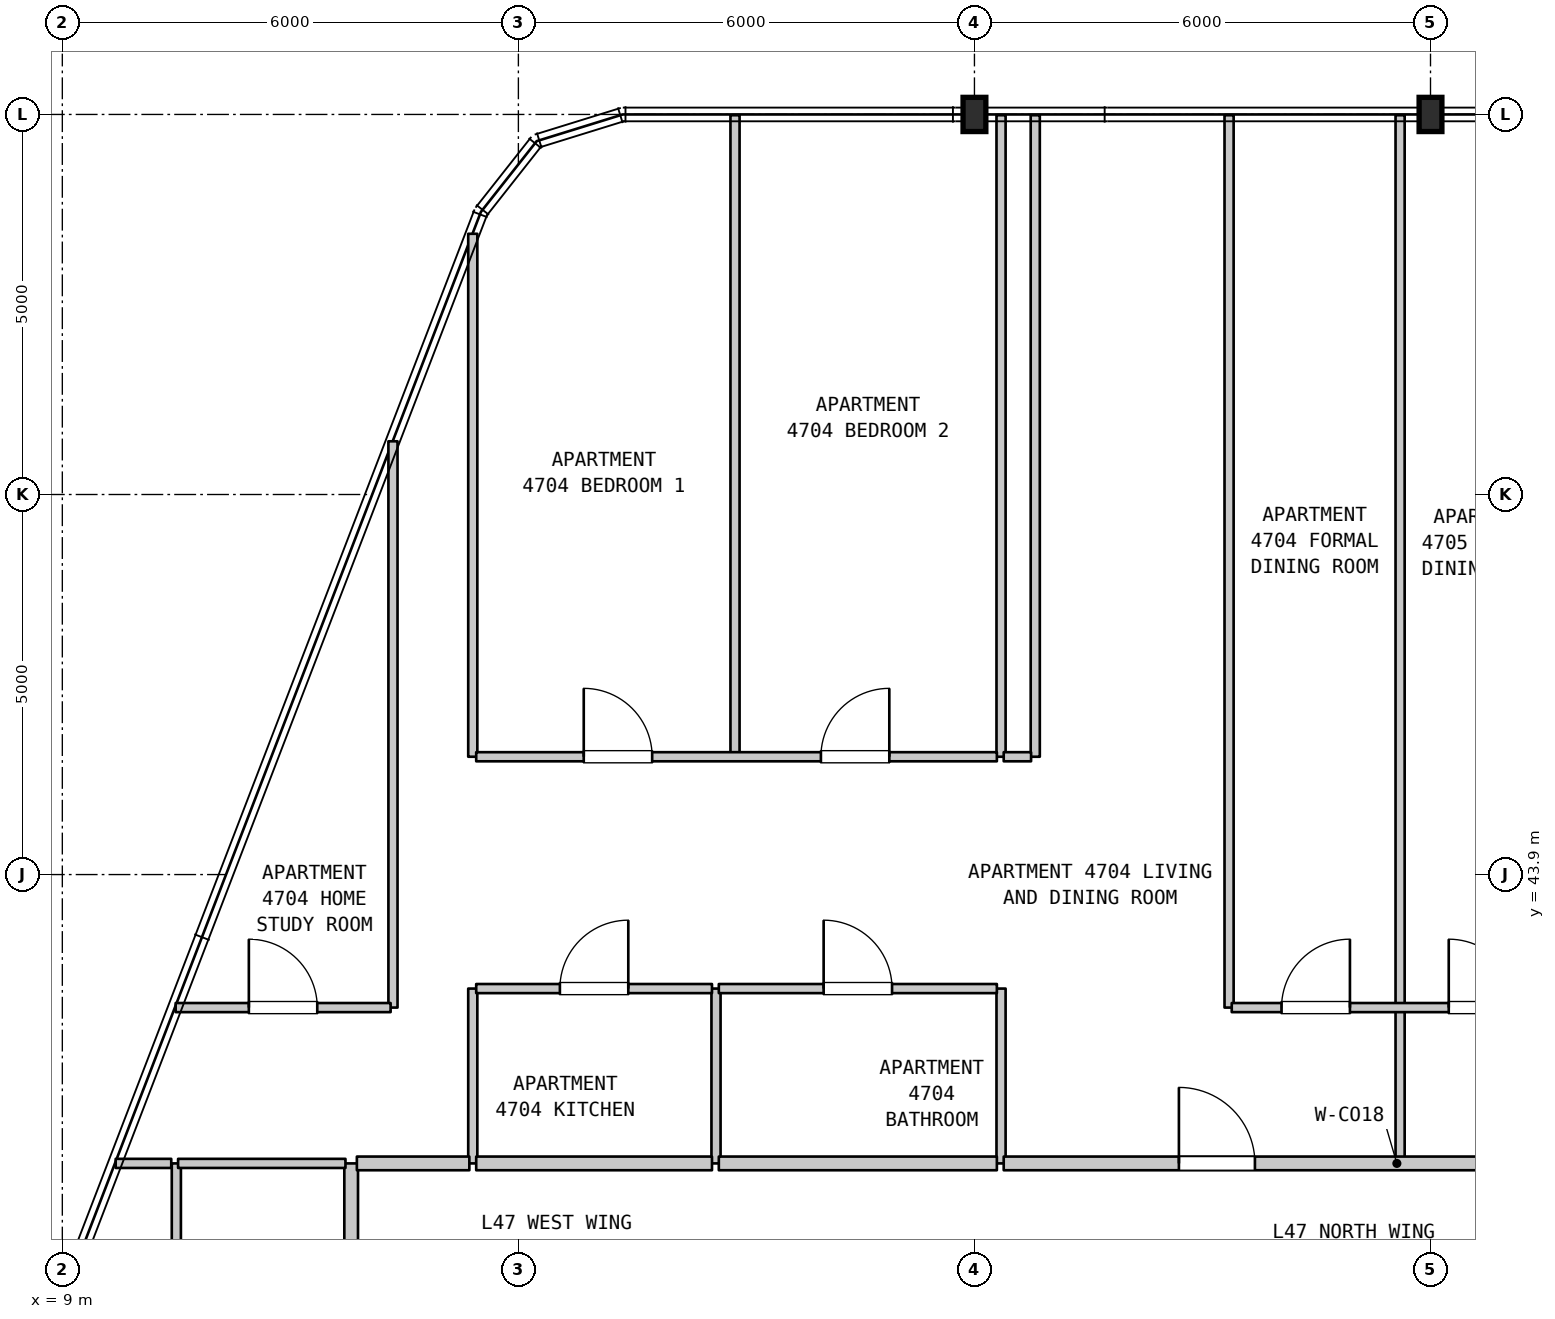
"""IFC4 building model, lengths in metres.
Left out: names, types, materials, properties, quantities, classifications, styles, units other than length and angle.
Written with IfcOpenShell. Run it as: python <this file> out.ifc"""

import sys

from ifc_helpers import new_model, si_unit, direction, frame, frame_2d, origin, origin_2d, place, context, subcontext, project, spatial, rectangle, i_section, extrude, element, fill, save


model = new_model("IFC4")
c1 = context("Model", 3, precision=1e-05, world=origin(), true_north=direction((0.0, 1.0)))
c2 = subcontext(c1, "Body", "Model", "MODEL_VIEW")
j1 = project(units=[si_unit("LENGTHUNIT", "METRE"), si_unit("PLANEANGLEUNIT", "RADIAN")], contexts=[c1])
p1 = place(None, origin())
s1 = spatial("IfcSite", under=j1, at=p1, CompositionType="ELEMENT")
p2 = place(p1, origin())
s2 = spatial("IfcBuilding", under=s1, at=p2, CompositionType="ELEMENT")
p3 = place(p2, frame((0.0, 0.0, 192.1)))
s3 = spatial("IfcBuildingStorey", under=s2, at=p3, CompositionType="ELEMENT", Elevation=192.1)
for number, where, z_axis, x_axis in (
    (1, (21.0, 53.9, 0.0), (0.0, 0.0, 1.0), (1.0, 0.0, 0.0)),
    (2, (27.0, 53.9, 0.0), (0.0, 0.0, 1.0), (1.0, 0.0, 0.0)),
):
    element("IfcColumn", number, at=place(p3, frame(where, z_axis=z_axis, x_axis=x_axis)), inside=s3, PredefinedType="COLUMN", context=c2, shape_type="SweptSolid", body=[
        extrude(i_section(OverallWidth=0.3, OverallDepth=0.45, WebThickness=0.014, FlangeThickness=0.026, FilletRadius=0.027, at=origin_2d()), origin(), (0.0, 0.0, 1.0), 3.7),
    ])
p4 = place(p3, frame((10.5, 31.45, 0.0), z_axis=(0.0, 0.0, 1.0), x_axis=(0.0, 1.0, 0.0)))
e3 = element("IfcWall", 3, at=p4, inside=s3, PredefinedType="PARTITIONING", context=c2, shape_type="SweptSolid", body=[
    extrude(rectangle(XDim=8.65, YDim=0.12, at=frame_2d((4.325, 0.0))), origin(), (0.0, 0.0, 1.0), 3.39),
])
p5 = place(p3, frame((12.8, 31.45, 0.0), z_axis=(0.0, 0.0, 1.0), x_axis=(0.0, 1.0, 0.0)))
e4 = element("IfcWall", 4, at=p5, inside=s3, PredefinedType="STANDARD", context=c2, shape_type="SweptSolid", body=[
    extrude(rectangle(XDim=8.65, YDim=0.18, at=frame_2d((4.325, 0.0))), origin(), (0.0, 0.0, 1.0), 3.39),
])
p6 = place(p3, frame((13.35, 42.15, 0.0), z_axis=(0.0, 0.0, 1.0), x_axis=(0.0, 1.0, 0.0)))
e5 = element("IfcWall", 5, at=p6, inside=s3, PredefinedType="PARTITIONING", context=c2, shape_type="SweptSolid", body=[
    extrude(rectangle(XDim=7.45, YDim=0.12, at=frame_2d((3.725, 0.0))), origin(), (0.0, 0.0, 1.0), 3.39),
])
p7 = place(p3, frame((14.4, 40.1, 0.0), z_axis=(0.0, 0.0, 1.0), x_axis=(0.0, 1.0, 0.0)))
e6 = element("IfcWall", 6, at=p7, inside=s3, PredefinedType="PARTITIONING", context=c2, shape_type="SweptSolid", body=[
    extrude(rectangle(XDim=2.3, YDim=0.12, at=frame_2d((1.15, 0.0))), origin(), (0.0, 0.0, 1.0), 3.39),
])
p8 = place(p3, frame((14.4, 45.45, 0.0), z_axis=(0.0, 0.0, 1.0), x_axis=(0.0, 1.0, 0.0)))
e7 = element("IfcWall", 7, at=p8, inside=s3, PredefinedType="PARTITIONING", context=c2, shape_type="SweptSolid", body=[
    extrude(rectangle(XDim=6.88, YDim=0.12, at=frame_2d((3.44, 0.0))), origin(), (0.0, 0.0, 1.0), 3.39),
])
p9 = place(p3, frame((17.6, 40.1, 0.0), z_axis=(0.0, 0.0, 1.0), x_axis=(0.0, 1.0, 0.0)))
e8 = element("IfcWall", 8, at=p9, inside=s3, PredefinedType="PARTITIONING", context=c2, shape_type="SweptSolid", body=[
    extrude(rectangle(XDim=2.3, YDim=0.12, at=frame_2d((1.15, 0.0))), origin(), (0.0, 0.0, 1.0), 3.39),
])
p10 = place(p3, frame((17.85, 45.45, 0.0), z_axis=(0.0, 0.0, 1.0), x_axis=(0.0, 1.0, 0.0)))
e9 = element("IfcWall", 9, at=p10, inside=s3, PredefinedType="PARTITIONING", context=c2, shape_type="SweptSolid", body=[
    extrude(rectangle(XDim=8.44, YDim=0.12, at=frame_2d((4.22, 0.0))), origin(), (0.0, 0.0, 1.0), 3.39),
])
p11 = place(p3, frame((21.35, 40.1, 0.0), z_axis=(0.0, 0.0, 1.0), x_axis=(0.0, 1.0, 0.0)))
e10 = element("IfcWall", 10, at=p11, inside=s3, PredefinedType="PARTITIONING", context=c2, shape_type="SweptSolid", body=[
    extrude(rectangle(XDim=2.3, YDim=0.12, at=frame_2d((1.15, 0.0))), origin(), (0.0, 0.0, 1.0), 3.39),
])
for number, where, z_axis, x_axis in (
    (11, (21.35, 45.45, 0.0), (0.0, 0.0, 1.0), (0.0, 1.0, 0.0)),
    (12, (21.8, 45.45, 0.0), (0.0, 0.0, 1.0), (0.0, 1.0, 0.0)),
):
    element("IfcWall", number, at=place(p3, frame(where, z_axis=z_axis, x_axis=x_axis)), inside=s3, PredefinedType="PARTITIONING", context=c2, shape_type="SweptSolid", body=[
        extrude(rectangle(XDim=8.44, YDim=0.12, at=frame_2d((4.22, 0.0))), origin(), (0.0, 0.0, 1.0), 3.39),
    ])
p12 = place(p3, frame((24.35, 42.15, 0.0), z_axis=(0.0, 0.0, 1.0), x_axis=(0.0, 1.0, 0.0)))
e13 = element("IfcWall", 13, at=p12, inside=s3, PredefinedType="PARTITIONING", context=c2, shape_type="SweptSolid", body=[
    extrude(rectangle(XDim=11.74, YDim=0.12, at=frame_2d((5.87, 0.0))), origin(), (0.0, 0.0, 1.0), 3.39),
])
p13 = place(p3, frame((26.6, 40.1, 0.0), z_axis=(0.0, 0.0, 1.0), x_axis=(0.0, 1.0, 0.0)))
e14 = element("IfcWall", 14, at=p13, inside=s3, PredefinedType="PARTITIONING", context=c2, shape_type="SweptSolid", body=[
    extrude(rectangle(XDim=2.05, YDim=0.12, at=frame_2d((1.025, 0.0))), origin(), (0.0, 0.0, 1.0), 3.39),
])
p14 = place(p3, frame((26.6, 42.15, 0.0), z_axis=(0.0, 0.0, 1.0), x_axis=(0.0, 1.0, 0.0)))
e15 = element("IfcWall", 15, at=p14, inside=s3, PredefinedType="PARTITIONING", context=c2, shape_type="SweptSolid", body=[
    extrude(rectangle(XDim=11.74, YDim=0.12, at=frame_2d((5.87, 0.0))), origin(), (0.0, 0.0, 1.0), 3.39),
])
p15 = place(p3, frame((9.702, 40.1, 0.0), z_axis=(0.0, 0.0, 1.0), x_axis=(1.0, 0.0, 0.0)))
e16 = element("IfcWall", 16, at=p15, inside=s3, PredefinedType="PARTITIONING", context=c2, shape_type="SweptSolid", body=[
    extrude(rectangle(XDim=0.731, YDim=0.12, at=frame_2d((0.366, 0.0))), origin(), (0.0, 0.0, 1.0), 3.39),
])
p16 = place(p3, frame((10.523, 40.1, 0.0), z_axis=(0.0, 0.0, 1.0), x_axis=(1.0, 0.0, 0.0)))
e17 = element("IfcWall", 17, at=p16, inside=s3, PredefinedType="PARTITIONING", context=c2, shape_type="SweptSolid", body=[
    extrude(rectangle(XDim=2.202, YDim=0.12, at=frame_2d((1.101, 0.0))), origin(), (0.0, 0.0, 1.0), 3.39),
])
p17 = place(p3, frame((12.875, 40.1, 0.0), z_axis=(0.0, 0.0, 1.0), x_axis=(1.0, 0.0, 0.0)))
e18 = element("IfcWall", 18, at=p17, inside=s3, PredefinedType="STANDARD", context=c2, shape_type="SweptSolid", body=[
    extrude(rectangle(XDim=1.48, YDim=0.18, at=frame_2d((0.74, 0.0))), origin(), (0.0, 0.0, 1.0), 3.39),
])
p18 = place(p3, frame((14.445, 40.1, 0.0), z_axis=(0.0, 0.0, 1.0), x_axis=(1.0, 0.0, 0.0)))
e19 = element("IfcWall", 19, at=p18, inside=s3, PredefinedType="STANDARD", context=c2, shape_type="SweptSolid", body=[
    extrude(rectangle(XDim=3.102, YDim=0.18, at=frame_2d((1.551, 0.0))), origin(), (0.0, 0.0, 1.0), 3.39),
])
p19 = place(p3, frame((17.637, 40.1, 0.0), z_axis=(0.0, 0.0, 1.0), x_axis=(1.0, 0.0, 0.0)))
e20 = element("IfcWall", 20, at=p19, inside=s3, PredefinedType="STANDARD", context=c2, shape_type="SweptSolid", body=[
    extrude(rectangle(XDim=3.658, YDim=0.18, at=frame_2d((1.829, 0.0))), origin(), (0.0, 0.0, 1.0), 3.39),
])
p20 = place(p3, frame((21.385, 40.1, 0.0), z_axis=(0.0, 0.0, 1.0), x_axis=(1.0, 0.0, 0.0)))
e21 = element("IfcWall", 21, at=p20, inside=s3, PredefinedType="STANDARD", context=c2, shape_type="SweptSolid", body=[
    extrude(rectangle(XDim=10.345, YDim=0.18, at=frame_2d((5.172, 0.0))), origin(), (0.0, 0.0, 1.0), 3.39),
])
p21 = place(p20, frame((2.305, 0.0, 0.0)))
e22 = element("IfcOpeningElement", 22, at=p21, cuts=e21, PredefinedType="OPENING", context=c2, shape_type="SweptSolid", body=[
    extrude(rectangle(XDim=1.0, YDim=2.15, at=frame_2d((0.5, 1.075))), frame((0.0, 0.1, 0.0), z_axis=(0.0, -1.0, 0.0), x_axis=(1.0, 0.0, 0.0)), (0.0, 0.0, 1.0), 0.2),
])
p22 = place(p20, frame((7.235, 0.0, 0.0)))
e23 = element("IfcOpeningElement", 23, at=p22, cuts=e21, PredefinedType="OPENING", context=c2, shape_type="SweptSolid", body=[
    extrude(rectangle(XDim=1.0, YDim=2.15, at=frame_2d((0.5, 1.075))), frame((0.0, 0.1, 0.0), z_axis=(0.0, -1.0, 0.0), x_axis=(1.0, 0.0, 0.0)), (0.0, 0.0, 1.0), 0.2),
])
p23 = place(p3, frame((10.491, 42.15, 0.0), z_axis=(0.0, 0.0, 1.0), x_axis=(1.0, 0.0, 0.0)))
e24 = element("IfcWall", 24, at=p23, inside=s3, PredefinedType="PARTITIONING", context=c2, shape_type="SweptSolid", body=[
    extrude(rectangle(XDim=2.828, YDim=0.12, at=frame_2d((1.414, 0.0))), origin(), (0.0, 0.0, 1.0), 3.39),
])
p24 = place(p23, frame((0.963, 0.0, 0.0)))
e25 = element("IfcOpeningElement", 25, at=p24, cuts=e24, PredefinedType="OPENING", context=c2, shape_type="SweptSolid", body=[
    extrude(rectangle(XDim=0.9, YDim=2.15, at=frame_2d((0.45, 1.075))), frame((0.0, 0.07, 0.0), z_axis=(0.0, -1.0, 0.0), x_axis=(1.0, 0.0, 0.0)), (0.0, 0.0, 1.0), 0.14),
])
p25 = place(p3, frame((24.385, 42.15, 0.0), z_axis=(0.0, 0.0, 1.0), x_axis=(1.0, 0.0, 0.0)))
e26 = element("IfcWall", 26, at=p25, inside=s3, PredefinedType="PARTITIONING", context=c2, shape_type="SweptSolid", body=[
    extrude(rectangle(XDim=4.41, YDim=0.12, at=frame_2d((2.205, 0.0))), origin(), (0.0, 0.0, 1.0), 3.39),
])
p26 = place(p25, frame((0.655, 0.0, 0.0)))
e27 = element("IfcOpeningElement", 27, at=p26, cuts=e26, PredefinedType="OPENING", context=c2, shape_type="SweptSolid", body=[
    extrude(rectangle(XDim=0.9, YDim=2.15, at=frame_2d((0.45, 1.075))), frame((0.0, 0.07, 0.0), z_axis=(0.0, -1.0, 0.0), x_axis=(1.0, 0.0, 0.0)), (0.0, 0.0, 1.0), 0.14),
])
p27 = place(p25, frame((2.855, 0.0, 0.0)))
e28 = element("IfcOpeningElement", 28, at=p27, cuts=e26, PredefinedType="OPENING", context=c2, shape_type="SweptSolid", body=[
    extrude(rectangle(XDim=0.9, YDim=2.15, at=frame_2d((0.45, 1.075))), frame((0.0, 0.07, 0.0), z_axis=(0.0, -1.0, 0.0), x_axis=(1.0, 0.0, 0.0)), (0.0, 0.0, 1.0), 0.14),
])
p28 = place(p3, frame((14.445, 42.4, 0.0), z_axis=(0.0, 0.0, 1.0), x_axis=(1.0, 0.0, 0.0)))
e29 = element("IfcWall", 29, at=p28, inside=s3, PredefinedType="PARTITIONING", context=c2, shape_type="SweptSolid", body=[
    extrude(rectangle(XDim=3.102, YDim=0.12, at=frame_2d((1.551, 0.0))), origin(), (0.0, 0.0, 1.0), 3.39),
])
p29 = place(p28, frame((1.101, 0.0, 0.0)))
e30 = element("IfcOpeningElement", 30, at=p29, cuts=e29, PredefinedType="OPENING", context=c2, shape_type="SweptSolid", body=[
    extrude(rectangle(XDim=0.9, YDim=2.15, at=frame_2d((0.45, 1.075))), frame((0.0, 0.07, 0.0), z_axis=(0.0, -1.0, 0.0), x_axis=(1.0, 0.0, 0.0)), (0.0, 0.0, 1.0), 0.14),
])
p30 = place(p3, frame((17.637, 42.4, 0.0), z_axis=(0.0, 0.0, 1.0), x_axis=(1.0, 0.0, 0.0)))
e31 = element("IfcWall", 31, at=p30, inside=s3, PredefinedType="PARTITIONING", context=c2, shape_type="SweptSolid", body=[
    extrude(rectangle(XDim=3.658, YDim=0.12, at=frame_2d((1.829, 0.0))), origin(), (0.0, 0.0, 1.0), 3.39),
])
p31 = place(p30, frame((1.379, 0.0, 0.0)))
e32 = element("IfcOpeningElement", 32, at=p31, cuts=e31, PredefinedType="OPENING", context=c2, shape_type="SweptSolid", body=[
    extrude(rectangle(XDim=0.9, YDim=2.1, at=frame_2d((0.45, 1.05))), frame((0.0, 0.07, 0.0), z_axis=(0.0, -1.0, 0.0), x_axis=(1.0, 0.0, 0.0)), (0.0, 0.0, 1.0), 0.14),
])
p32 = place(p3, frame((14.445, 45.45, 0.0), z_axis=(0.0, 0.0, 1.0), x_axis=(1.0, 0.0, 0.0)))
e33 = element("IfcWall", 33, at=p32, inside=s3, PredefinedType="PARTITIONING", context=c2, shape_type="SweptSolid", body=[
    extrude(rectangle(XDim=6.85, YDim=0.12, at=frame_2d((3.425, 0.0))), origin(), (0.0, 0.0, 1.0), 3.39),
])
p33 = place(p32, frame((1.415, 0.0, 0.0)))
e34 = element("IfcOpeningElement", 34, at=p33, cuts=e33, PredefinedType="OPENING", context=c2, shape_type="SweptSolid", body=[
    extrude(rectangle(XDim=0.9, YDim=2.15, at=frame_2d((0.45, 1.075))), frame((0.0, 0.07, 0.0), z_axis=(0.0, -1.0, 0.0), x_axis=(1.0, 0.0, 0.0)), (0.0, 0.0, 1.0), 0.14),
])
p34 = place(p32, frame((4.535, 0.0, 0.0)))
e35 = element("IfcOpeningElement", 35, at=p34, cuts=e33, PredefinedType="OPENING", context=c2, shape_type="SweptSolid", body=[
    extrude(rectangle(XDim=0.9, YDim=2.15, at=frame_2d((0.45, 1.075))), frame((0.0, 0.07, 0.0), z_axis=(0.0, -1.0, 0.0), x_axis=(1.0, 0.0, 0.0)), (0.0, 0.0, 1.0), 0.14),
])
p35 = place(p3, frame((21.385, 45.45, 0.0), z_axis=(0.0, 0.0, 1.0), x_axis=(1.0, 0.0, 0.0)))
e36 = element("IfcWall", 36, at=p35, inside=s3, PredefinedType="PARTITIONING", context=c2, shape_type="SweptSolid", body=[
    extrude(rectangle(XDim=0.36, YDim=0.12, at=frame_2d((0.18, 0.0))), origin(), (0.0, 0.0, 1.0), 3.39),
])
p36 = place(p21, origin())
e37 = element("IfcDoor", 37, at=p36, inside=s3, OperationType="SINGLE_SWING_LEFT", PredefinedType="DOOR", context=c2, shape_type="SweptSolid", body=[
    extrude(rectangle(XDim=1.0, YDim=2.15, at=frame_2d((0.5, 1.075))), frame((0.0, 0.025, 0.0), z_axis=(0.0, -1.0, 0.0), x_axis=(1.0, 0.0, 0.0)), (0.0, 0.0, 1.0), 0.05),
])
fill(e22, e37)
p37 = place(p24, origin())
e38 = element("IfcDoor", 38, at=p37, inside=s3, OperationType="SINGLE_SWING_LEFT", PredefinedType="DOOR", context=c2, shape_type="SweptSolid", body=[
    extrude(rectangle(XDim=0.9, YDim=2.15, at=frame_2d((0.45, 1.075))), frame((0.0, 0.025, 0.0), z_axis=(0.0, -1.0, 0.0), x_axis=(1.0, 0.0, 0.0)), (0.0, 0.0, 1.0), 0.05),
])
fill(e25, e38)
p38 = place(p26, origin())
e39 = element("IfcDoor", 39, at=p38, inside=s3, OperationType="SINGLE_SWING_RIGHT", PredefinedType="DOOR", context=c2, shape_type="SweptSolid", body=[
    extrude(rectangle(XDim=0.9, YDim=2.15, at=frame_2d((0.45, 1.075))), frame((0.0, 0.025, 0.0), z_axis=(0.0, -1.0, 0.0), x_axis=(1.0, 0.0, 0.0)), (0.0, 0.0, 1.0), 0.05),
])
fill(e27, e39)
p39 = place(p27, origin())
e40 = element("IfcDoor", 40, at=p39, inside=s3, OperationType="SINGLE_SWING_LEFT", PredefinedType="DOOR", context=c2, shape_type="SweptSolid", body=[
    extrude(rectangle(XDim=0.9, YDim=2.15, at=frame_2d((0.45, 1.075))), frame((0.0, 0.025, 0.0), z_axis=(0.0, -1.0, 0.0), x_axis=(1.0, 0.0, 0.0)), (0.0, 0.0, 1.0), 0.05),
])
fill(e28, e40)
p40 = place(p29, origin())
e41 = element("IfcDoor", 41, at=p40, inside=s3, OperationType="SINGLE_SWING_RIGHT", PredefinedType="DOOR", context=c2, shape_type="SweptSolid", body=[
    extrude(rectangle(XDim=0.9, YDim=2.15, at=frame_2d((0.45, 1.075))), frame((0.0, 0.025, 0.0), z_axis=(0.0, -1.0, 0.0), x_axis=(1.0, 0.0, 0.0)), (0.0, 0.0, 1.0), 0.05),
])
fill(e30, e41)
p41 = place(p31, origin())
e42 = element("IfcDoor", 42, at=p41, inside=s3, OperationType="SINGLE_SWING_LEFT", PredefinedType="DOOR", context=c2, shape_type="SweptSolid", body=[
    extrude(rectangle(XDim=0.9, YDim=2.1, at=frame_2d((0.45, 1.05))), frame((0.0, 0.025, 0.0), z_axis=(0.0, -1.0, 0.0), x_axis=(1.0, 0.0, 0.0)), (0.0, 0.0, 1.0), 0.05),
])
fill(e32, e42)
p42 = place(p33, origin())
e43 = element("IfcDoor", 43, at=p42, inside=s3, OperationType="SINGLE_SWING_LEFT", PredefinedType="DOOR", context=c2, shape_type="SweptSolid", body=[
    extrude(rectangle(XDim=0.9, YDim=2.15, at=frame_2d((0.45, 1.075))), frame((0.0, 0.025, 0.0), z_axis=(0.0, -1.0, 0.0), x_axis=(1.0, 0.0, 0.0)), (0.0, 0.0, 1.0), 0.05),
])
fill(e34, e43)
p43 = place(p34, origin())
e44 = element("IfcDoor", 44, at=p43, inside=s3, OperationType="SINGLE_SWING_RIGHT", PredefinedType="DOOR", context=c2, shape_type="SweptSolid", body=[
    extrude(rectangle(XDim=0.9, YDim=2.15, at=frame_2d((0.45, 1.075))), frame((0.0, 0.025, 0.0), z_axis=(0.0, -1.0, 0.0), x_axis=(1.0, 0.0, 0.0)), (0.0, 0.0, 1.0), 0.05),
])
fill(e35, e44)
save(model, sys.argv[1])
